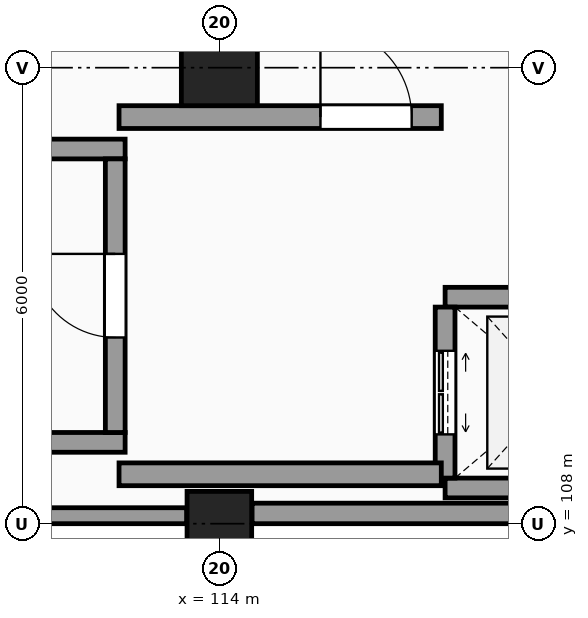
"""IFC4 building model, lengths in metres.
Left out: names, types, materials, properties, quantities, classifications, styles, units other than length and angle.
Written with IfcOpenShell. Run it as: python <this file> out.ifc"""

import sys

from ifc_helpers import new_model, si_unit, direction, frame, frame_2d, origin, origin_2d, place, context, subcontext, project, spatial, rectangle, circle, extrude, element, fill, save


model = new_model("IFC4")
c1 = context("Model", 3, precision=1e-05, world=origin(), true_north=direction((0.0, 1.0)))
c2 = subcontext(c1, "Body", "Model", "MODEL_VIEW")
j1 = project(units=[si_unit("LENGTHUNIT", "METRE"), si_unit("PLANEANGLEUNIT", "RADIAN")], contexts=[c1])
p1 = place(None, origin())
s1 = spatial("IfcSite", under=j1, at=p1, CompositionType="ELEMENT")
p2 = place(p1, origin())
s2 = spatial("IfcBuilding", under=s1, at=p2, CompositionType="ELEMENT")
p3 = place(p2, frame((0.0, 0.0, 6.0)))
s3 = spatial("IfcBuildingStorey", under=s2, at=p3, CompositionType="ELEMENT", Elevation=6.0)
p4 = place(p3, frame((114.0, 108.0, 0.0), z_axis=(0.0, 0.0, 1.0), x_axis=(1.0, 0.0, 0.0)))
e1 = element("IfcColumn", 1, at=p4, inside=s3, PredefinedType="COLUMN", context=c2, shape_type="SweptSolid", body=[
    extrude(circle(Radius=0.425, at=origin_2d()), origin(), (0.0, 0.0, 1.0), 4.5),
])
p5 = place(p3, frame((114.0, 114.0, 0.0), z_axis=(0.0, 0.0, 1.0), x_axis=(1.0, 0.0, 0.0)))
e2 = element("IfcColumn", 2, at=p5, inside=s3, PredefinedType="COLUMN", context=c2, shape_type="SweptSolid", body=[
    extrude(circle(Radius=0.5, at=origin_2d()), origin(), (0.0, 0.0, 1.0), 4.5),
])
p6 = place(p3, frame((108.38, 108.105, 0.0), z_axis=(0.0, 0.0, 1.0), x_axis=(1.0, 0.0, 0.0)))
e3 = element("IfcWall", 3, at=p6, inside=s3, PredefinedType="SOLIDWALL", context=c2, shape_type="SweptSolid", body=[
    extrude(rectangle(XDim=5.19, YDim=0.21, at=frame_2d((2.595, 0.0))), origin(), (0.0, 0.0, 1.0), 3.47),
])
p7 = place(p3, frame((114.43, 108.135, 0.0), z_axis=(0.0, 0.0, 1.0), x_axis=(1.0, 0.0, 0.0)))
e4 = element("IfcWall", 4, at=p7, inside=s3, PredefinedType="SOLIDWALL", context=c2, shape_type="SweptSolid", body=[
    extrude(rectangle(XDim=5.065, YDim=0.27, at=frame_2d((2.533, 0.0))), origin(), (0.0, 0.0, 1.0), 3.47),
])
for number, where, z_axis, x_axis in (
    (5, (102.04, 109.07, 0.0), (0.0, 0.0, 1.0), (1.0, 0.0, 0.0)),
    (6, (102.04, 112.93, 0.0), (0.0, 0.0, 1.0), (1.0, 0.0, 0.0)),
):
    element("IfcWall", number, at=place(p3, frame(where, z_axis=z_axis, x_axis=x_axis)), inside=s3, PredefinedType="SHEAR", context=c2, shape_type="SweptSolid", body=[
        extrude(rectangle(XDim=10.72, YDim=0.26, at=frame_2d((5.36, 0.0))), origin(), (0.0, 0.0, 1.0), 4.5),
    ])
p8 = place(p3, frame((112.63, 109.2, 0.0), z_axis=(0.0, 0.0, 1.0), x_axis=(0.0, 1.0, 0.0)))
e7 = element("IfcWall", 7, at=p8, inside=s3, PredefinedType="SHEAR", context=c2, shape_type="SweptSolid", body=[
    extrude(rectangle(XDim=3.6, YDim=0.26, at=frame_2d((1.8, 0.0))), origin(), (0.0, 0.0, 1.0), 4.5),
])
p9 = place(p8, frame((1.25, 0.0, 0.0)))
e8 = element("IfcOpeningElement", 8, at=p9, cuts=e7, PredefinedType="OPENING", context=c2, shape_type="SweptSolid", body=[
    extrude(rectangle(XDim=1.1, YDim=2.15, at=frame_2d((0.55, 1.075))), frame((0.0, 0.14, 0.0), z_axis=(0.0, -1.0, 0.0), x_axis=(1.0, 0.0, 0.0)), (0.0, 0.0, 1.0), 0.28),
])
for number, where, z_axis, x_axis in (
    (9, (116.97, 108.47, 0.0), (0.0, 0.0, 1.0), (1.0, 0.0, 0.0)),
    (10, (116.97, 110.98, 0.0), (0.0, 0.0, 1.0), (1.0, 0.0, 0.0)),
):
    element("IfcWall", number, at=place(p3, frame(where, z_axis=z_axis, x_axis=x_axis)), inside=s3, PredefinedType="SHEAR", context=c2, shape_type="SweptSolid", body=[
        extrude(rectangle(XDim=2.91, YDim=0.26, at=frame_2d((1.455, 0.0))), origin(), (0.0, 0.0, 1.0), 4.5),
    ])
p10 = place(p3, frame((116.97, 108.6, 0.0), z_axis=(0.0, 0.0, 1.0), x_axis=(0.0, 1.0, 0.0)))
e11 = element("IfcWall", 11, at=p10, inside=s3, PredefinedType="SHEAR", context=c2, shape_type="SweptSolid", body=[
    extrude(rectangle(XDim=2.25, YDim=0.26, at=frame_2d((1.125, 0.0))), origin(), (0.0, 0.0, 1.0), 4.5),
])
p11 = place(p10, frame((0.575, 0.0, 0.0)))
e12 = element("IfcOpeningElement", 12, at=p11, cuts=e11, PredefinedType="OPENING", context=c2, shape_type="SweptSolid", body=[
    extrude(rectangle(XDim=1.1, YDim=2.2, at=frame_2d((0.55, 1.1))), frame((0.0, 0.14, 0.0), z_axis=(0.0, -1.0, 0.0), x_axis=(1.0, 0.0, 0.0)), (0.0, 0.0, 1.0), 0.28),
])
p12 = place(p3, frame((112.68, 113.35, 0.0), z_axis=(0.0, 0.0, 1.0), x_axis=(1.0, 0.0, 0.0)))
e13 = element("IfcWall", 13, at=p12, inside=s3, PredefinedType="SHEAR", context=c2, shape_type="SweptSolid", body=[
    extrude(rectangle(XDim=4.24, YDim=0.3, at=frame_2d((2.12, 0.0))), origin(), (0.0, 0.0, 1.0), 4.5),
])
p13 = place(p12, frame((2.65, 0.0, 0.0)))
e14 = element("IfcOpeningElement", 14, at=p13, cuts=e13, PredefinedType="OPENING", context=c2, shape_type="SweptSolid", body=[
    extrude(rectangle(XDim=1.2, YDim=2.2, at=frame_2d((0.6, 1.1))), frame((0.0, 0.16, 0.0), z_axis=(0.0, -1.0, 0.0), x_axis=(1.0, 0.0, 0.0)), (0.0, 0.0, 1.0), 0.32),
])
p14 = place(p3, frame((112.68, 108.65, 0.0), z_axis=(0.0, 0.0, 1.0), x_axis=(1.0, 0.0, 0.0)))
e15 = element("IfcWall", 15, at=p14, inside=s3, PredefinedType="SHEAR", context=c2, shape_type="SweptSolid", body=[
    extrude(rectangle(XDim=4.24, YDim=0.3, at=frame_2d((2.12, 0.0))), origin(), (0.0, 0.0, 1.0), 4.5),
])
p15 = place(p9, origin())
e16 = element("IfcDoor", 16, at=p15, inside=s3, OperationType="SINGLE_SWING_RIGHT", PredefinedType="DOOR", context=c2, shape_type="SweptSolid", body=[
    extrude(rectangle(XDim=1.1, YDim=2.15, at=frame_2d((0.55, 1.075))), frame((0.0, 0.025, 0.0), z_axis=(0.0, -1.0, 0.0), x_axis=(1.0, 0.0, 0.0)), (0.0, 0.0, 1.0), 0.05),
])
fill(e8, e16)
p16 = place(p11, origin())
e17 = element("IfcDoor", 17, at=p16, inside=s3, OperationType="DOUBLE_DOOR_SLIDING", PredefinedType="DOOR", context=c2, shape_type="SweptSolid", body=[
    extrude(rectangle(XDim=1.1, YDim=2.2, at=frame_2d((0.55, 1.1))), frame((0.0, 0.025, 0.0), z_axis=(0.0, -1.0, 0.0), x_axis=(1.0, 0.0, 0.0)), (0.0, 0.0, 1.0), 0.05),
])
fill(e12, e17)
p17 = place(p13, origin())
e18 = element("IfcDoor", 18, at=p17, inside=s3, OperationType="SINGLE_SWING_LEFT", PredefinedType="DOOR", context=c2, shape_type="SweptSolid", body=[
    extrude(rectangle(XDim=1.2, YDim=2.2, at=frame_2d((0.6, 1.1))), frame((0.0, 0.025, 0.0), z_axis=(0.0, -1.0, 0.0), x_axis=(1.0, 0.0, 0.0)), (0.0, 0.0, 1.0), 0.05),
])
fill(e14, e18)
save(model, sys.argv[1])
